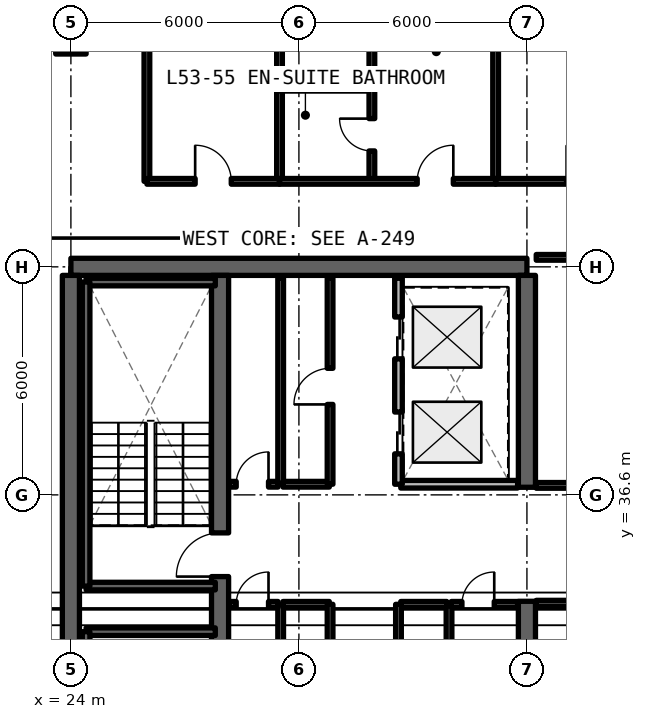
"""IFC4 building model, lengths in metres.
Left out: names, types, materials, properties, quantities, classifications, styles, units other than length and angle.
Written with IfcOpenShell. Run it as: python <this file> out.ifc"""

import sys

from ifc_helpers import new_model, si_unit, direction, frame, frame_2d, origin, origin_2d, place, context, subcontext, project, spatial, rectangle, extrude, element, fill, save


model = new_model("IFC4")
c1 = context("Model", 3, precision=1e-05, world=origin(), true_north=direction((0.0, 1.0)))
c2 = subcontext(c1, "Body", "Model", "MODEL_VIEW")
j1 = project(units=[si_unit("LENGTHUNIT", "METRE"), si_unit("PLANEANGLEUNIT", "RADIAN")], contexts=[c1])
p1 = place(None, origin())
s1 = spatial("IfcSite", under=j1, at=p1, CompositionType="ELEMENT")
p2 = place(p1, origin())
s2 = spatial("IfcBuilding", under=s1, at=p2, CompositionType="ELEMENT")
p3 = place(p2, frame((0.0, 0.0, 191.73)))
s3 = spatial("IfcBuildingStorey", under=s2, at=p3, CompositionType="ELEMENT", Elevation=191.73)
p4 = place(p3, frame((36.0, 42.6, 0.0), z_axis=(0.0, 0.0, 1.0), x_axis=(-1.0, 0.0, 0.0)))
e1 = element("IfcWall", 1, at=p4, inside=s3, PredefinedType="SHEAR", context=c2, shape_type="SweptSolid", body=[
    extrude(rectangle(XDim=12.0, YDim=0.45, at=frame_2d((6.0, 0.0))), origin(), (0.0, 0.0, 1.0), 3.3),
])
p5 = place(p3, frame((24.0, 24.825, 0.0), z_axis=(0.0, 0.0, 1.0), x_axis=(0.0, 1.0, 0.0)))
e2 = element("IfcWall", 2, at=p5, inside=s3, PredefinedType="SHEAR", context=c2, shape_type="SweptSolid", body=[
    extrude(rectangle(XDim=17.55, YDim=0.45, at=frame_2d((8.775, 0.0))), origin(), (0.0, 0.0, 1.0), 3.3),
])
p6 = place(p3, frame((36.0, 24.825, 0.0), z_axis=(0.0, 0.0, 1.0), x_axis=(0.0, 1.0, 0.0)))
e3 = element("IfcWall", 3, at=p6, inside=s3, PredefinedType="SHEAR", context=c2, shape_type="SweptSolid", body=[
    extrude(rectangle(XDim=8.975, YDim=0.45, at=frame_2d((4.488, 0.0))), origin(), (0.0, 0.0, 1.0), 3.3),
])
p7 = place(p3, frame((36.0, 36.8, 0.0), z_axis=(0.0, 0.0, 1.0), x_axis=(0.0, 1.0, 0.0)))
e4 = element("IfcWall", 4, at=p7, inside=s3, PredefinedType="SHEAR", context=c2, shape_type="SweptSolid", body=[
    extrude(rectangle(XDim=5.575, YDim=0.45, at=frame_2d((2.788, 0.0))), origin(), (0.0, 0.0, 1.0), 3.3),
])
p8 = place(p3, frame((27.925, 24.825, 0.0), z_axis=(0.0, 0.0, 1.0), x_axis=(0.0, 1.0, 0.0)))
e5 = element("IfcWall", 5, at=p8, inside=s3, PredefinedType="SHEAR", context=c2, shape_type="SweptSolid", body=[
    extrude(rectangle(XDim=17.55, YDim=0.45, at=frame_2d((8.775, 0.0))), origin(), (0.0, 0.0, 1.0), 3.3),
])
p9 = place(p8, frame((0.425, 0.0, 0.0)))
e6 = element("IfcOpeningElement", 6, at=p9, cuts=e5, PredefinedType="OPENING", context=c2, shape_type="SweptSolid", body=[
    extrude(rectangle(XDim=1.15, YDim=2.15, at=frame_2d((0.575, 1.075))), frame((0.0, 0.235, 0.0), z_axis=(0.0, -1.0, 0.0), x_axis=(1.0, 0.0, 0.0)), (0.0, 0.0, 1.0), 0.47),
])
p10 = place(p8, frame((9.625, 0.0, 0.0)))
e7 = element("IfcOpeningElement", 7, at=p10, cuts=e5, PredefinedType="OPENING", context=c2, shape_type="SweptSolid", body=[
    extrude(rectangle(XDim=1.15, YDim=2.15, at=frame_2d((0.575, 1.075))), frame((0.0, 0.235, 0.0), z_axis=(0.0, -1.0, 0.0), x_axis=(1.0, 0.0, 0.0)), (0.0, 0.0, 1.0), 0.47),
])
p11 = place(p3, frame((24.0, 48.6, 0.0), z_axis=(0.0, 0.0, 1.0), x_axis=(1.0, 0.0, 0.0)))
e8 = element("IfcColumn", 8, at=p11, inside=s3, PredefinedType="COLUMN", context=c2, shape_type="SweptSolid", body=[
    extrude(rectangle(XDim=0.8, YDim=0.8, at=origin_2d()), origin(), (0.0, 0.0, 1.0), 3.3),
])
p12 = place(p3, frame((29.52, 28.5, 0.0), z_axis=(0.0, 0.0, 1.0), x_axis=(0.0, 1.0, 0.0)))
e9 = element("IfcWall", 9, at=p12, inside=s3, PredefinedType="SOLIDWALL", context=c2, shape_type="SweptSolid", body=[
    extrude(rectangle(XDim=5.22, YDim=0.15, at=frame_2d((2.61, 0.0))), origin(), (0.0, 0.0, 1.0), 2.35),
])
p13 = place(p3, frame((28.17, 33.72, 0.0), z_axis=(0.0, 0.0, 1.0), x_axis=(1.0, 0.0, 0.0)))
e10 = element("IfcWall", 10, at=p13, inside=s3, PredefinedType="SOLIDWALL", context=c2, shape_type="SweptSolid", body=[
    extrude(rectangle(XDim=1.28, YDim=0.15, at=frame_2d((0.64, 0.0))), origin(), (0.0, 0.0, 1.0), 2.35),
])
p14 = place(p13, frame((0.18, 0.0, 0.0)))
e11 = element("IfcOpeningElement", 11, at=p14, cuts=e10, PredefinedType="OPENING", context=c2, shape_type="SweptSolid", body=[
    extrude(rectangle(XDim=0.85, YDim=2.1, at=frame_2d((0.425, 1.05))), frame((0.0, 0.085, 0.0), z_axis=(0.0, -1.0, 0.0), x_axis=(1.0, 0.0, 0.0)), (0.0, 0.0, 1.0), 0.17),
])
p15 = place(p3, frame((29.58, 33.72, 0.0), z_axis=(0.0, 0.0, 1.0), x_axis=(1.0, 0.0, 0.0)))
e12 = element("IfcWall", 12, at=p15, inside=s3, PredefinedType="SOLIDWALL", context=c2, shape_type="SweptSolid", body=[
    extrude(rectangle(XDim=1.22, YDim=0.15, at=frame_2d((0.61, 0.0))), origin(), (0.0, 0.0, 1.0), 2.35),
])
p16 = place(p3, frame((30.82, 28.5, 0.0), z_axis=(0.0, 0.0, 1.0), x_axis=(0.0, 1.0, 0.0)))
e13 = element("IfcWall", 13, at=p16, inside=s3, PredefinedType="SOLIDWALL", context=c2, shape_type="SweptSolid", body=[
    extrude(rectangle(XDim=5.22, YDim=0.15, at=frame_2d((2.61, 0.0))), origin(), (0.0, 0.0, 1.0), 2.35),
])
p17 = place(p16, frame((2.0, 0.0, 0.0)))
e14 = element("IfcOpeningElement", 14, at=p17, cuts=e13, PredefinedType="OPENING", context=c2, shape_type="SweptSolid", body=[
    extrude(rectangle(XDim=0.95, YDim=2.15, at=frame_2d((0.475, 1.075))), frame((0.0, 0.085, 0.0), z_axis=(0.0, -1.0, 0.0), x_axis=(1.0, 0.0, 0.0)), (0.0, 0.0, 1.0), 0.17),
])
p18 = place(p3, frame((33.95, 28.5, 0.0), z_axis=(0.0, 0.0, 1.0), x_axis=(0.0, 1.0, 0.0)))
e15 = element("IfcWall", 15, at=p18, inside=s3, PredefinedType="SOLIDWALL", context=c2, shape_type="SweptSolid", body=[
    extrude(rectangle(XDim=5.22, YDim=0.15, at=frame_2d((2.61, 0.0))), origin(), (0.0, 0.0, 1.0), 2.35),
])
p19 = place(p3, frame((32.68, 33.72, 0.0), z_axis=(0.0, 0.0, 1.0), x_axis=(1.0, 0.0, 0.0)))
e16 = element("IfcWall", 16, at=p19, inside=s3, PredefinedType="SOLIDWALL", context=c2, shape_type="SweptSolid", body=[
    extrude(rectangle(XDim=1.21, YDim=0.15, at=frame_2d((0.605, 0.0))), origin(), (0.0, 0.0, 1.0), 2.35),
])
p20 = place(p3, frame((34.01, 33.72, 0.0), z_axis=(0.0, 0.0, 1.0), x_axis=(1.0, 0.0, 0.0)))
e17 = element("IfcWall", 17, at=p20, inside=s3, PredefinedType="SOLIDWALL", context=c2, shape_type="SweptSolid", body=[
    extrude(rectangle(XDim=1.745, YDim=0.15, at=frame_2d((0.873, 0.0))), origin(), (0.0, 0.0, 1.0), 2.35),
])
p21 = place(p20, frame((0.28, 0.0, 0.0)))
e18 = element("IfcOpeningElement", 18, at=p21, cuts=e17, PredefinedType="OPENING", context=c2, shape_type="SweptSolid", body=[
    extrude(rectangle(XDim=0.85, YDim=2.1, at=frame_2d((0.425, 1.05))), frame((0.0, 0.085, 0.0), z_axis=(0.0, -1.0, 0.0), x_axis=(1.0, 0.0, 0.0)), (0.0, 0.0, 1.0), 0.17),
])
p22 = place(p3, frame((32.62, 28.5, 0.0), z_axis=(0.0, 0.0, 1.0), x_axis=(0.0, 1.0, 0.0)))
e19 = element("IfcWall", 19, at=p22, inside=s3, PredefinedType="SOLIDWALL", context=c2, shape_type="SweptSolid", body=[
    extrude(rectangle(XDim=5.22, YDim=0.15, at=frame_2d((2.61, 0.0))), origin(), (0.0, 0.0, 1.0), 2.35),
])
p23 = place(p22, frame((2.0, 0.0, 0.0)))
e20 = element("IfcOpeningElement", 20, at=p23, cuts=e19, PredefinedType="OPENING", context=c2, shape_type="SweptSolid", body=[
    extrude(rectangle(XDim=0.95, YDim=2.15, at=frame_2d((0.475, 1.075))), frame((0.0, 0.085, 0.0), z_axis=(0.0, -1.0, 0.0), x_axis=(1.0, 0.0, 0.0)), (0.0, 0.0, 1.0), 0.17),
])
p24 = place(p3, frame((29.52, 36.88, 0.0), z_axis=(0.0, 0.0, 1.0), x_axis=(0.0, 1.0, 0.0)))
e21 = element("IfcWall", 21, at=p24, inside=s3, PredefinedType="SOLIDWALL", context=c2, shape_type="SweptSolid", body=[
    extrude(rectangle(XDim=5.42, YDim=0.15, at=frame_2d((2.71, 0.0))), origin(), (0.0, 0.0, 1.0), 2.35),
])
p25 = place(p3, frame((28.17, 36.88, 0.0), z_axis=(0.0, 0.0, 1.0), x_axis=(1.0, 0.0, 0.0)))
e22 = element("IfcWall", 22, at=p25, inside=s3, PredefinedType="SOLIDWALL", context=c2, shape_type="SweptSolid", body=[
    extrude(rectangle(XDim=1.28, YDim=0.15, at=frame_2d((0.64, 0.0))), origin(), (0.0, 0.0, 1.0), 2.35),
])
p26 = place(p25, frame((0.18, 0.0, 0.0)))
e23 = element("IfcOpeningElement", 23, at=p26, cuts=e22, PredefinedType="OPENING", context=c2, shape_type="SweptSolid", body=[
    extrude(rectangle(XDim=0.85, YDim=2.1, at=frame_2d((0.425, 1.05))), frame((0.0, 0.085, 0.0), z_axis=(0.0, -1.0, 0.0), x_axis=(1.0, 0.0, 0.0)), (0.0, 0.0, 1.0), 0.17),
])
p27 = place(p3, frame((29.58, 36.88, 0.0), z_axis=(0.0, 0.0, 1.0), x_axis=(1.0, 0.0, 0.0)))
e24 = element("IfcWall", 24, at=p27, inside=s3, PredefinedType="SOLIDWALL", context=c2, shape_type="SweptSolid", body=[
    extrude(rectangle(XDim=1.22, YDim=0.15, at=frame_2d((0.61, 0.0))), origin(), (0.0, 0.0, 1.0), 2.35),
])
p28 = place(p3, frame((30.82, 36.88, 0.0), z_axis=(0.0, 0.0, 1.0), x_axis=(0.0, 1.0, 0.0)))
e25 = element("IfcWall", 25, at=p28, inside=s3, PredefinedType="SOLIDWALL", context=c2, shape_type="SweptSolid", body=[
    extrude(rectangle(XDim=5.42, YDim=0.15, at=frame_2d((2.71, 0.0))), origin(), (0.0, 0.0, 1.0), 2.35),
])
p29 = place(p28, frame((2.1, 0.0, 0.0)))
e26 = element("IfcOpeningElement", 26, at=p29, cuts=e25, PredefinedType="OPENING", context=c2, shape_type="SweptSolid", body=[
    extrude(rectangle(XDim=0.95, YDim=2.15, at=frame_2d((0.475, 1.075))), frame((0.0, 0.085, 0.0), z_axis=(0.0, -1.0, 0.0), x_axis=(1.0, 0.0, 0.0)), (0.0, 0.0, 1.0), 0.17),
])
p30 = place(p3, frame((32.68, 36.88, 0.0), z_axis=(0.0, 0.0, 1.0), x_axis=(1.0, 0.0, 0.0)))
e27 = element("IfcWall", 27, at=p30, inside=s3, PredefinedType="SOLIDWALL", context=c2, shape_type="SweptSolid", body=[
    extrude(rectangle(XDim=3.075, YDim=0.2, at=frame_2d((1.538, 0.0))), origin(), (0.0, 0.0, 1.0), 2.35),
])
p31 = place(p3, frame((32.62, 36.88, 0.0), z_axis=(0.0, 0.0, 1.0), x_axis=(0.0, 1.0, 0.0)))
e28 = element("IfcWall", 28, at=p31, inside=s3, PredefinedType="SOLIDWALL", context=c2, shape_type="SweptSolid", body=[
    extrude(rectangle(XDim=5.42, YDim=0.2, at=frame_2d((2.71, 0.0))), origin(), (0.0, 0.0, 1.0), 2.35),
])
p32 = place(p31, frame((0.8, 0.0, 0.0)))
e29 = element("IfcOpeningElement", 29, at=p32, cuts=e28, PredefinedType="OPENING", context=c2, shape_type="SweptSolid", body=[
    extrude(rectangle(XDim=1.1, YDim=2.2, at=frame_2d((0.55, 1.1))), frame((0.0, 0.11, 0.0), z_axis=(0.0, -1.0, 0.0), x_axis=(1.0, 0.0, 0.0)), (0.0, 0.0, 1.0), 0.22),
])
p33 = place(p31, frame((3.3, 0.0, 0.0)))
e30 = element("IfcOpeningElement", 30, at=p33, cuts=e28, PredefinedType="OPENING", context=c2, shape_type="SweptSolid", body=[
    extrude(rectangle(XDim=1.1, YDim=2.2, at=frame_2d((0.55, 1.1))), frame((0.0, 0.11, 0.0), z_axis=(0.0, -1.0, 0.0), x_axis=(1.0, 0.0, 0.0)), (0.0, 0.0, 1.0), 0.22),
])
p34 = place(p3, frame((36.245, 33.75, 0.0), z_axis=(0.0, 0.0, 1.0), x_axis=(1.0, 0.0, 0.0)))
e31 = element("IfcWall", 31, at=p34, inside=s3, PredefinedType="SOLIDWALL", context=c2, shape_type="SweptSolid", body=[
    extrude(rectangle(XDim=7.905, YDim=0.15, at=frame_2d((3.952, 0.0))), origin(), (0.0, 0.0, 1.0), 2.35),
])
p35 = place(p34, frame((3.478, 0.0, 0.0)))
e32 = element("IfcOpeningElement", 32, at=p35, cuts=e31, PredefinedType="OPENING", context=c2, shape_type="SweptSolid", body=[
    extrude(rectangle(XDim=0.95, YDim=2.15, at=frame_2d((0.475, 1.075))), frame((0.0, 0.085, 0.0), z_axis=(0.0, -1.0, 0.0), x_axis=(1.0, 0.0, 0.0)), (0.0, 0.0, 1.0), 0.17),
])
p36 = place(p3, frame((36.245, 36.85, 0.0), z_axis=(0.0, 0.0, 1.0), x_axis=(1.0, 0.0, 0.0)))
e33 = element("IfcWall", 33, at=p36, inside=s3, PredefinedType="SOLIDWALL", context=c2, shape_type="SweptSolid", body=[
    extrude(rectangle(XDim=7.905, YDim=0.15, at=frame_2d((3.952, 0.0))), origin(), (0.0, 0.0, 1.0), 2.35),
])
p37 = place(p36, frame((3.478, 0.0, 0.0)))
e34 = element("IfcOpeningElement", 34, at=p37, cuts=e33, PredefinedType="OPENING", context=c2, shape_type="SweptSolid", body=[
    extrude(rectangle(XDim=0.95, YDim=2.15, at=frame_2d((0.475, 1.075))), frame((0.0, 0.085, 0.0), z_axis=(0.0, -1.0, 0.0), x_axis=(1.0, 0.0, 0.0)), (0.0, 0.0, 1.0), 0.17),
])
p38 = place(p3, frame((36.245, 42.85, 0.0), z_axis=(0.0, 0.0, 1.0), x_axis=(1.0, 0.0, 0.0)))
e35 = element("IfcWall", 35, at=p38, inside=s3, PredefinedType="SOLIDWALL", context=c2, shape_type="SweptSolid", body=[
    extrude(rectangle(XDim=7.905, YDim=0.15, at=frame_2d((3.952, 0.0))), origin(), (0.0, 0.0, 1.0), 2.35),
])
for number, where, z_axis, x_axis in (
    (36, (26.0, 44.85, 0.0), (0.0, 0.0, 1.0), (0.0, 1.0, 0.0)),
    (37, (29.49, 44.85, 0.0), (0.0, 0.0, 1.0), (0.0, 1.0, 0.0)),
):
    element("IfcWall", number, at=place(p3, frame(where, z_axis=z_axis, x_axis=x_axis)), inside=s3, PredefinedType="SOLIDWALL", context=c2, shape_type="SweptSolid", body=[
        extrude(rectangle(XDim=10.08, YDim=0.15, at=frame_2d((5.04, 0.0))), origin(), (0.0, 0.0, 1.0), 2.35),
    ])
p39 = place(p3, frame((26.0, 44.85, 0.0), z_axis=(0.0, 0.0, 1.0), x_axis=(1.0, 0.0, 0.0)))
e38 = element("IfcWall", 38, at=p39, inside=s3, PredefinedType="SOLIDWALL", context=c2, shape_type="SweptSolid", body=[
    extrude(rectangle(XDim=3.49, YDim=0.15, at=frame_2d((1.745, 0.0))), origin(), (0.0, 0.0, 1.0), 2.35),
])
p40 = place(p39, frame((1.27, 0.0, 0.0)))
e39 = element("IfcOpeningElement", 39, at=p40, cuts=e38, PredefinedType="OPENING", context=c2, shape_type="SweptSolid", body=[
    extrude(rectangle(XDim=0.95, YDim=2.15, at=frame_2d((0.475, 1.075))), frame((0.0, 0.085, 0.0), z_axis=(0.0, -1.0, 0.0), x_axis=(1.0, 0.0, 0.0)), (0.0, 0.0, 1.0), 0.17),
])
p41 = place(p3, frame((35.176, 44.85, 0.0), z_axis=(0.0, 0.0, 1.0), x_axis=(0.0, 1.0, 0.0)))
e40 = element("IfcWall", 40, at=p41, inside=s3, PredefinedType="SOLIDWALL", context=c2, shape_type="SweptSolid", body=[
    extrude(rectangle(XDim=10.08, YDim=0.15, at=frame_2d((5.04, 0.0))), origin(), (0.0, 0.0, 1.0), 2.35),
])
p42 = place(p3, frame((29.49, 47.3, 0.0), z_axis=(0.0, 0.0, 1.0), x_axis=(1.0, 0.0, 0.0)))
e41 = element("IfcWall", 41, at=p42, inside=s3, PredefinedType="PARTITIONING", context=c2, shape_type="SweptSolid", body=[
    extrude(rectangle(XDim=2.43, YDim=0.15, at=frame_2d((1.215, 0.0))), origin(), (0.0, 0.0, 1.0), 2.35),
])
p43 = place(p3, frame((31.92, 44.85, 0.0), z_axis=(0.0, 0.0, 1.0), x_axis=(0.0, 1.0, 0.0)))
e42 = element("IfcWall", 42, at=p43, inside=s3, PredefinedType="PARTITIONING", context=c2, shape_type="SweptSolid", body=[
    extrude(rectangle(XDim=10.08, YDim=0.15, at=frame_2d((5.04, 0.0))), origin(), (0.0, 0.0, 1.0), 2.35),
])
p44 = place(p43, frame((0.8, 0.0, 0.0)))
e43 = element("IfcOpeningElement", 43, at=p44, cuts=e42, PredefinedType="OPENING", context=c2, shape_type="SweptSolid", body=[
    extrude(rectangle(XDim=0.85, YDim=2.1, at=frame_2d((0.425, 1.05))), frame((0.0, 0.085, 0.0), z_axis=(0.0, -1.0, 0.0), x_axis=(1.0, 0.0, 0.0)), (0.0, 0.0, 1.0), 0.17),
])
p45 = place(p43, frame((5.162, 0.0, 0.0)))
e44 = element("IfcOpeningElement", 44, at=p45, cuts=e42, PredefinedType="OPENING", context=c2, shape_type="SweptSolid", body=[
    extrude(rectangle(XDim=0.85, YDim=2.1, at=frame_2d((0.425, 1.05))), frame((0.0, 0.085, 0.0), z_axis=(0.0, -1.0, 0.0), x_axis=(1.0, 0.0, 0.0)), (0.0, 0.0, 1.0), 0.17),
])
p46 = place(p3, frame((29.49, 44.85, 0.0), z_axis=(0.0, 0.0, 1.0), x_axis=(1.0, 0.0, 0.0)))
e45 = element("IfcWall", 45, at=p46, inside=s3, PredefinedType="SOLIDWALL", context=c2, shape_type="SweptSolid", body=[
    extrude(rectangle(XDim=5.687, YDim=0.15, at=frame_2d((2.843, 0.0))), origin(), (0.0, 0.0, 1.0), 2.35),
])
p47 = place(p46, frame((3.624, 0.0, 0.0)))
e46 = element("IfcOpeningElement", 46, at=p47, cuts=e45, PredefinedType="OPENING", context=c2, shape_type="SweptSolid", body=[
    extrude(rectangle(XDim=0.95, YDim=2.15, at=frame_2d((0.475, 1.075))), frame((0.0, 0.085, 0.0), z_axis=(0.0, -1.0, 0.0), x_axis=(1.0, 0.0, 0.0)), (0.0, 0.0, 1.0), 0.17),
])
p48 = place(p3, frame((35.176, 44.85, 0.0), z_axis=(0.0, 0.0, 1.0), x_axis=(1.0, 0.0, 0.0)))
e47 = element("IfcWall", 47, at=p48, inside=s3, PredefinedType="SOLIDWALL", context=c2, shape_type="SweptSolid", body=[
    extrude(rectangle(XDim=4.685, YDim=0.15, at=frame_2d((2.342, 0.0))), origin(), (0.0, 0.0, 1.0), 2.35),
])
p49 = place(p48, frame((1.867, 0.0, 0.0)))
e48 = element("IfcOpeningElement", 48, at=p49, cuts=e47, PredefinedType="OPENING", context=c2, shape_type="SweptSolid", body=[
    extrude(rectangle(XDim=0.95, YDim=2.15, at=frame_2d((0.475, 1.075))), frame((0.0, 0.085, 0.0), z_axis=(0.0, -1.0, 0.0), x_axis=(1.0, 0.0, 0.0)), (0.0, 0.0, 1.0), 0.17),
])
p50 = place(p3, frame((27.8, 33.0, 0.0), z_axis=(0.0, 0.0, 1.0), x_axis=(-1.0, 0.0, 0.0)))
e49 = element("IfcWall", 49, at=p50, inside=s3, PredefinedType="SOLIDWALL", context=c2, shape_type="SweptSolid", body=[
    extrude(rectangle(XDim=3.4, YDim=0.2, at=frame_2d((1.7, 0.0))), origin(), (0.0, 0.0, 1.0), 3.3),
])
p51 = place(p3, frame((24.4, 33.0, 0.0), z_axis=(0.0, 0.0, 1.0), x_axis=(0.0, -1.0, 0.0)))
e50 = element("IfcWall", 50, at=p51, inside=s3, PredefinedType="SOLIDWALL", context=c2, shape_type="SweptSolid", body=[
    extrude(rectangle(XDim=8.0, YDim=0.2, at=frame_2d((4.0, 0.0))), origin(), (0.0, 0.0, 1.0), 3.3),
])
for number, where, z_axis, x_axis in (
    (51, (24.4, 34.2, 0.0), (0.0, 0.0, 1.0), (1.0, 0.0, 0.0)),
    (52, (27.8, 42.2, 0.0), (0.0, 0.0, 1.0), (-1.0, 0.0, 0.0)),
):
    element("IfcWall", number, at=place(p3, frame(where, z_axis=z_axis, x_axis=x_axis)), inside=s3, PredefinedType="SOLIDWALL", context=c2, shape_type="SweptSolid", body=[
        extrude(rectangle(XDim=3.4, YDim=0.2, at=frame_2d((1.7, 0.0))), origin(), (0.0, 0.0, 1.0), 3.3),
    ])
p52 = place(p3, frame((24.4, 42.2, 0.0), z_axis=(0.0, 0.0, 1.0), x_axis=(0.0, -1.0, 0.0)))
e53 = element("IfcWall", 53, at=p52, inside=s3, PredefinedType="SOLIDWALL", context=c2, shape_type="SweptSolid", body=[
    extrude(rectangle(XDim=8.0, YDim=0.2, at=frame_2d((4.0, 0.0))), origin(), (0.0, 0.0, 1.0), 3.3),
])
p53 = place(p14, origin())
e54 = element("IfcDoor", 54, at=p53, inside=s3, OperationType="SINGLE_SWING_RIGHT", PredefinedType="DOOR", context=c2, shape_type="SweptSolid", body=[
    extrude(rectangle(XDim=0.85, YDim=2.1, at=frame_2d((0.425, 1.05))), frame((0.0, 0.025, 0.0), z_axis=(0.0, -1.0, 0.0), x_axis=(1.0, 0.0, 0.0)), (0.0, 0.0, 1.0), 0.05),
])
fill(e11, e54)
p54 = place(p21, origin())
e55 = element("IfcDoor", 55, at=p54, inside=s3, OperationType="SINGLE_SWING_RIGHT", PredefinedType="DOOR", context=c2, shape_type="SweptSolid", body=[
    extrude(rectangle(XDim=0.85, YDim=2.1, at=frame_2d((0.425, 1.05))), frame((0.0, 0.025, 0.0), z_axis=(0.0, -1.0, 0.0), x_axis=(1.0, 0.0, 0.0)), (0.0, 0.0, 1.0), 0.05),
])
fill(e18, e55)
p55 = place(p26, origin())
e56 = element("IfcDoor", 56, at=p55, inside=s3, OperationType="SINGLE_SWING_RIGHT", PredefinedType="DOOR", context=c2, shape_type="SweptSolid", body=[
    extrude(rectangle(XDim=0.85, YDim=2.1, at=frame_2d((0.425, 1.05))), frame((0.0, 0.025, 0.0), z_axis=(0.0, -1.0, 0.0), x_axis=(1.0, 0.0, 0.0)), (0.0, 0.0, 1.0), 0.05),
])
fill(e23, e56)
p56 = place(p29, origin())
e57 = element("IfcDoor", 57, at=p56, inside=s3, OperationType="SINGLE_SWING_LEFT", PredefinedType="DOOR", context=c2, shape_type="SweptSolid", body=[
    extrude(rectangle(XDim=0.95, YDim=2.15, at=frame_2d((0.475, 1.075))), frame((0.0, 0.025, 0.0), z_axis=(0.0, -1.0, 0.0), x_axis=(1.0, 0.0, 0.0)), (0.0, 0.0, 1.0), 0.05),
])
fill(e26, e57)
p57 = place(p32, origin())
e58 = element("IfcDoor", 58, at=p57, inside=s3, OperationType="SLIDING_TO_LEFT", PredefinedType="DOOR", context=c2, shape_type="SweptSolid", body=[
    extrude(rectangle(XDim=1.1, YDim=2.2, at=frame_2d((0.55, 1.1))), frame((0.0, 0.025, 0.0), z_axis=(0.0, -1.0, 0.0), x_axis=(1.0, 0.0, 0.0)), (0.0, 0.0, 1.0), 0.05),
])
fill(e29, e58)
p58 = place(p33, origin())
e59 = element("IfcDoor", 59, at=p58, inside=s3, OperationType="SLIDING_TO_RIGHT", PredefinedType="DOOR", context=c2, shape_type="SweptSolid", body=[
    extrude(rectangle(XDim=1.1, YDim=2.2, at=frame_2d((0.55, 1.1))), frame((0.0, 0.025, 0.0), z_axis=(0.0, -1.0, 0.0), x_axis=(1.0, 0.0, 0.0)), (0.0, 0.0, 1.0), 0.05),
])
fill(e30, e59)
p59 = place(p40, origin())
e60 = element("IfcDoor", 60, at=p59, inside=s3, OperationType="SINGLE_SWING_LEFT", PredefinedType="DOOR", context=c2, shape_type="SweptSolid", body=[
    extrude(rectangle(XDim=0.95, YDim=2.15, at=frame_2d((0.475, 1.075))), frame((0.0, 0.025, 0.0), z_axis=(0.0, -1.0, 0.0), x_axis=(1.0, 0.0, 0.0)), (0.0, 0.0, 1.0), 0.05),
])
fill(e39, e60)
p60 = place(p44, origin())
e61 = element("IfcDoor", 61, at=p60, inside=s3, OperationType="SINGLE_SWING_RIGHT", PredefinedType="DOOR", context=c2, shape_type="SweptSolid", body=[
    extrude(rectangle(XDim=0.85, YDim=2.1, at=frame_2d((0.425, 1.05))), frame((0.0, 0.025, 0.0), z_axis=(0.0, -1.0, 0.0), x_axis=(1.0, 0.0, 0.0)), (0.0, 0.0, 1.0), 0.05),
])
fill(e43, e61)
p61 = place(p47, origin())
e62 = element("IfcDoor", 62, at=p61, inside=s3, OperationType="SINGLE_SWING_RIGHT", PredefinedType="DOOR", context=c2, shape_type="SweptSolid", body=[
    extrude(rectangle(XDim=0.95, YDim=2.15, at=frame_2d((0.475, 1.075))), frame((0.0, 0.025, 0.0), z_axis=(0.0, -1.0, 0.0), x_axis=(1.0, 0.0, 0.0)), (0.0, 0.0, 1.0), 0.05),
])
fill(e46, e62)
p62 = place(p10, origin())
e63 = element("IfcDoor", 63, at=p62, inside=s3, OperationType="SINGLE_SWING_LEFT", PredefinedType="DOOR", context=c2, shape_type="SweptSolid", body=[
    extrude(rectangle(XDim=1.15, YDim=2.15, at=frame_2d((0.575, 1.075))), frame((0.0, 0.025, 0.0), z_axis=(0.0, -1.0, 0.0), x_axis=(1.0, 0.0, 0.0)), (0.0, 0.0, 1.0), 0.05),
])
fill(e7, e63)
save(model, sys.argv[1])
